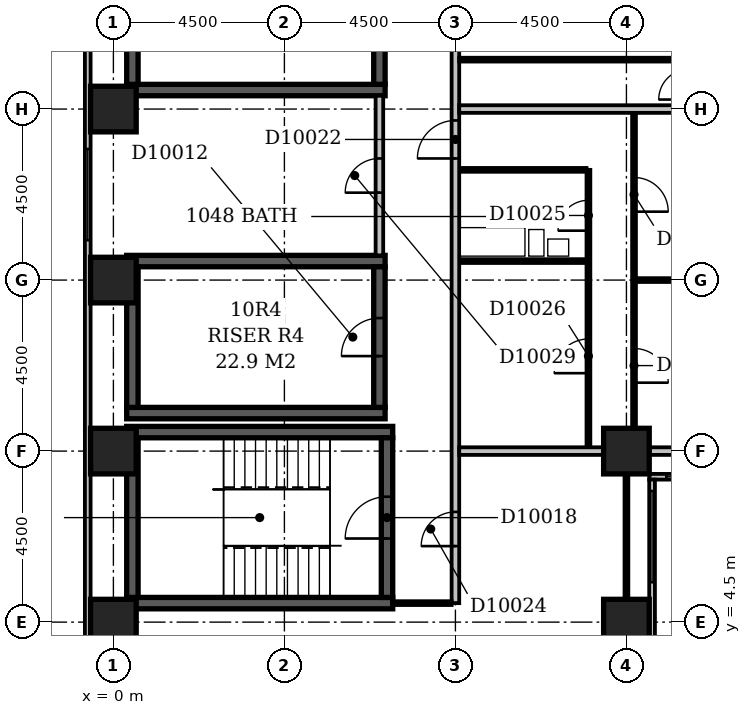
"""IFC4 building model, lengths in metres.
Left out: names, types, materials, properties, quantities, classifications, styles, units other than length and angle.
Written with IfcOpenShell. Run it as: python <this file> out.ifc"""

import sys

from ifc_helpers import new_model, si_unit, direction, frame, frame_2d, origin, origin_2d, place, context, subcontext, project, spatial, rectangle, extrude, element, fill, save


model = new_model("IFC4")
c1 = context("Model", 3, precision=1e-05, world=origin(), true_north=direction((0.0, 1.0)))
c2 = subcontext(c1, "Body", "Model", "MODEL_VIEW")
j1 = project(units=[si_unit("LENGTHUNIT", "METRE"), si_unit("PLANEANGLEUNIT", "RADIAN")], contexts=[c1])
p1 = place(None, origin())
s1 = spatial("IfcSite", under=j1, at=p1, CompositionType="ELEMENT")
p2 = place(p1, origin())
s2 = spatial("IfcBuilding", under=s1, at=p2, CompositionType="ELEMENT")
p3 = place(p2, frame((0.0, 0.0, 47.0)))
s3 = spatial("IfcBuildingStorey", under=s2, at=p3, CompositionType="ELEMENT", Elevation=47.0)
for number, where, z_axis, x_axis in (
    (1, (0.35, 5.0, -0.3), (0.0, 0.0, 1.0), (1.0, 0.0, 0.0)),
    (2, (0.35, 9.5, -0.3), (0.0, 0.0, 1.0), (1.0, 0.0, 0.0)),
):
    element("IfcWall", number, at=place(p3, frame(where, z_axis=z_axis, x_axis=x_axis)), inside=s3, PredefinedType="SHEAR", context=c2, shape_type="SweptSolid", body=[
        extrude(rectangle(XDim=7.0, YDim=0.3, at=frame_2d((3.5, 0.0))), origin(), (0.0, 0.0, 1.0), 3.6),
    ])
for number, where, z_axis, x_axis in (
    (3, (0.35, 10.0, -0.3), (0.0, 0.0, 1.0), (1.0, 0.0, 0.0)),
    (4, (0.35, 14.0, -0.3), (0.0, 0.0, 1.0), (1.0, 0.0, 0.0)),
    (5, (0.35, 18.5, -0.3), (0.0, 0.0, 1.0), (1.0, 0.0, 0.0)),
):
    element("IfcWall", number, at=place(p3, frame(where, z_axis=z_axis, x_axis=x_axis)), inside=s3, PredefinedType="SHEAR", context=c2, shape_type="SweptSolid", body=[
        extrude(rectangle(XDim=6.8, YDim=0.3, at=frame_2d((3.4, 0.0))), origin(), (0.0, 0.0, 1.0), 3.6),
    ])
p4 = place(p3, frame((0.5, 5.15, -0.3), z_axis=(0.0, 0.0, 1.0), x_axis=(0.0, 1.0, 0.0)))
e6 = element("IfcWall", 6, at=p4, inside=s3, PredefinedType="SHEAR", context=c2, shape_type="SweptSolid", body=[
    extrude(rectangle(XDim=4.2, YDim=0.3, at=frame_2d((2.1, 0.0))), origin(), (0.0, 0.0, 1.0), 3.6),
])
for number, where, z_axis, x_axis in (
    (7, (0.5, 10.15, -0.3), (0.0, 0.0, 1.0), (0.0, 1.0, 0.0)),
    (8, (0.5, 18.65, -0.3), (0.0, 0.0, 1.0), (0.0, 1.0, 0.0)),
):
    element("IfcWall", number, at=place(p3, frame(where, z_axis=z_axis, x_axis=x_axis)), inside=s3, PredefinedType="SHEAR", context=c2, shape_type="SweptSolid", body=[
        extrude(rectangle(XDim=3.7, YDim=0.3, at=frame_2d((1.85, 0.0))), origin(), (0.0, 0.0, 1.0), 3.6),
    ])
p5 = place(p3, frame((7.0, 10.15, -0.3), z_axis=(0.0, 0.0, 1.0), x_axis=(0.0, 1.0, 0.0)))
e9 = element("IfcWall", 9, at=p5, inside=s3, PredefinedType="SHEAR", context=c2, shape_type="SweptSolid", body=[
    extrude(rectangle(XDim=3.7, YDim=0.3, at=frame_2d((1.85, 0.0))), origin(), (0.0, 0.0, 1.0), 3.6),
])
p6 = place(p5, frame((1.35, 0.0, 0.3)))
e10 = element("IfcOpeningElement", 10, at=p6, cuts=e9, PredefinedType="OPENING", context=c2, shape_type="SweptSolid", body=[
    extrude(rectangle(XDim=1.0, YDim=2.1, at=frame_2d((0.5, 1.05))), frame((0.0, 0.162, 0.0), z_axis=(0.0, -1.0, 0.0), x_axis=(1.0, 0.0, 0.0)), (0.0, 0.0, 1.0), 0.324),
])
p7 = place(p3, frame((7.0, 18.65, -0.3), z_axis=(0.0, 0.0, 1.0), x_axis=(0.0, 1.0, 0.0)))
e11 = element("IfcWall", 11, at=p7, inside=s3, PredefinedType="SHEAR", context=c2, shape_type="SweptSolid", body=[
    extrude(rectangle(XDim=3.7, YDim=0.3, at=frame_2d((1.85, 0.0))), origin(), (0.0, 0.0, 1.0), 3.6),
])
p8 = place(p7, frame((1.35, 0.0, 0.3)))
e12 = element("IfcOpeningElement", 12, at=p8, cuts=e11, PredefinedType="OPENING", context=c2, shape_type="SweptSolid", body=[
    extrude(rectangle(XDim=1.0, YDim=2.1, at=frame_2d((0.5, 1.05))), frame((0.0, 0.162, 0.0), z_axis=(0.0, -1.0, 0.0), x_axis=(1.0, 0.0, 0.0)), (0.0, 0.0, 1.0), 0.324),
])
p9 = place(p3, frame((7.2, 5.15, -0.3), z_axis=(0.0, 0.0, 1.0), x_axis=(0.0, 1.0, 0.0)))
e13 = element("IfcWall", 13, at=p9, inside=s3, PredefinedType="SHEAR", context=c2, shape_type="SweptSolid", body=[
    extrude(rectangle(XDim=4.2, YDim=0.3, at=frame_2d((2.1, 0.0))), origin(), (0.0, 0.0, 1.0), 3.6),
])
p10 = place(p9, frame((1.55, 0.0, 0.3)))
e14 = element("IfcOpeningElement", 14, at=p10, cuts=e13, PredefinedType="OPENING", context=c2, shape_type="SweptSolid", body=[
    extrude(rectangle(XDim=1.1, YDim=2.1, at=frame_2d((0.55, 1.05))), frame((0.0, 0.162, 0.0), z_axis=(0.0, -1.0, 0.0), x_axis=(1.0, 0.0, 0.0)), (0.0, 0.0, 1.0), 0.324),
])
for number, where, z_axis, x_axis in (
    (15, (0.0, 4.5, -0.3), (0.0, 0.0, 1.0), (1.0, 0.0, 0.0)),
    (16, (13.5, 4.5, -0.3), (0.0, 0.0, 1.0), (1.0, 0.0, 0.0)),
    (17, (0.0, 9.0, -0.3), (0.0, 0.0, 1.0), (1.0, 0.0, 0.0)),
    (18, (13.5, 9.0, -0.3), (0.0, 0.0, 1.0), (1.0, 0.0, 0.0)),
    (19, (0.0, 13.5, -0.3), (0.0, 0.0, 1.0), (1.0, 0.0, 0.0)),
    (20, (0.0, 18.0, -0.3), (0.0, 0.0, 1.0), (1.0, 0.0, 0.0)),
):
    element("IfcColumn", number, at=place(p3, frame(where, z_axis=z_axis, x_axis=x_axis)), inside=s3, PredefinedType="COLUMN", context=c2, shape_type="SweptSolid", body=[
        extrude(rectangle(XDim=1.2, YDim=1.2, at=origin_2d()), origin(), (0.0, 0.0, 1.0), 3.6),
    ])
p11 = place(p3, frame((14.175, 3.9, 0.0), z_axis=(0.0, 0.0, 1.0), x_axis=(0.0, 1.0, 0.0)))
e21 = element("IfcWall", 21, at=p11, inside=s3, PredefinedType="STANDARD", context=c2, shape_type="SweptSolid", body=[
    extrude(rectangle(XDim=4.35, YDim=0.15, at=frame_2d((2.175, 0.0))), origin(), (0.0, 0.0, 1.0), 2.7),
])
p12 = place(p11, frame((1.65, 0.0, 0.6)))
e22 = element("IfcOpeningElement", 22, at=p12, cuts=e21, PredefinedType="OPENING", context=c2, shape_type="SweptSolid", body=[
    extrude(rectangle(XDim=2.4, YDim=1.8, at=frame_2d((1.2, 0.9))), frame((0.0, 0.087, 0.0), z_axis=(0.0, -1.0, 0.0), x_axis=(1.0, 0.0, 0.0)), (0.0, 0.0, 1.0), 0.174),
])
p13 = place(p3, frame((14.1, 8.325, 0.0), z_axis=(0.0, 0.0, 1.0), x_axis=(1.0, 0.0, 0.0)))
e23 = element("IfcWall", 23, at=p13, inside=s3, PredefinedType="STANDARD", context=c2, shape_type="SweptSolid", body=[
    extrude(rectangle(XDim=4.65, YDim=0.15, at=frame_2d((2.325, 0.0))), origin(), (0.0, 0.0, 1.0), 2.7),
])
p14 = place(p13, frame((0.45, 0.0, 0.6)))
e24 = element("IfcOpeningElement", 24, at=p14, cuts=e23, PredefinedType="OPENING", context=c2, shape_type="SweptSolid", body=[
    extrude(rectangle(XDim=2.4, YDim=1.8, at=frame_2d((1.2, 0.9))), frame((0.0, 0.087, 0.0), z_axis=(0.0, -1.0, 0.0), x_axis=(1.0, 0.0, 0.0)), (0.0, 0.0, 1.0), 0.174),
])
p15 = place(p3, frame((-0.675, 59.1, 0.0), z_axis=(0.0, 0.0, 1.0), x_axis=(0.0, -1.0, 0.0)))
e25 = element("IfcWall", 25, at=p15, inside=s3, PredefinedType="STANDARD", context=c2, shape_type="SweptSolid", body=[
    extrude(rectangle(XDim=55.35, YDim=0.15, at=frame_2d((27.675, 0.0))), origin(), (0.0, 0.0, 1.0), 2.7),
])
p16 = place(p15, frame((10.65, 0.0, 0.6)))
e26 = element("IfcOpeningElement", 26, at=p16, cuts=e25, PredefinedType="OPENING", context=c2, shape_type="SweptSolid", body=[
    extrude(rectangle(XDim=2.4, YDim=1.8, at=frame_2d((1.2, 0.9))), frame((0.0, 0.087, 0.0), z_axis=(0.0, -1.0, 0.0), x_axis=(1.0, 0.0, 0.0)), (0.0, 0.0, 1.0), 0.174),
])
p17 = place(p15, frame((42.15, 0.0, 0.6)))
e27 = element("IfcOpeningElement", 27, at=p17, cuts=e25, PredefinedType="OPENING", context=c2, shape_type="SweptSolid", body=[
    extrude(rectangle(XDim=2.4, YDim=1.8, at=frame_2d((1.2, 0.9))), frame((0.0, 0.087, 0.0), z_axis=(0.0, -1.0, 0.0), x_axis=(1.0, 0.0, 0.0)), (0.0, 0.0, 1.0), 0.174),
])
p18 = place(p3, frame((0.0, 4.4, 0.0), z_axis=(0.0, 0.0, 1.0), x_axis=(0.0, 1.0, 0.0)))
e28 = element("IfcWall", 28, at=p18, inside=s3, PredefinedType="PARTITIONING", context=c2, shape_type="SweptSolid", body=[
    extrude(rectangle(XDim=0.7, YDim=0.1, at=frame_2d((0.35, 0.0))), origin(), (0.0, 0.0, 1.0), 2.7),
])
p19 = place(p3, frame((7.349, 5.0, 0.0), z_axis=(0.0, 0.0, 1.0), x_axis=(1.0, 0.0, 0.0)))
e29 = element("IfcWall", 29, at=p19, inside=s3, PredefinedType="PARTITIONING", context=c2, shape_type="SweptSolid", body=[
    extrude(rectangle(XDim=1.551, YDim=0.1, at=frame_2d((0.775, 0.0))), origin(), (0.0, 0.0, 1.0), 3.3),
])
p20 = place(p3, frame((9.0, 5.0, 0.0), z_axis=(0.0, 0.0, 1.0), x_axis=(0.0, 1.0, 0.0)))
e30 = element("IfcWall", 30, at=p20, inside=s3, PredefinedType="PARTITIONING", context=c2, shape_type="SweptSolid", body=[
    extrude(rectangle(XDim=44.5, YDim=0.2, at=frame_2d((22.25, 0.0))), origin(), (0.0, 0.0, 1.0), 3.3),
])
p21 = place(p20, frame((28.45, 0.0, 0.0)))
e31 = element("IfcOpeningElement", 31, at=p21, cuts=e30, PredefinedType="OPENING", context=c2, shape_type="SweptSolid", body=[
    extrude(rectangle(XDim=1.0, YDim=2.1, at=frame_2d((0.5, 1.05))), frame((0.0, 0.112, 0.0), z_axis=(0.0, -1.0, 0.0), x_axis=(1.0, 0.0, 0.0)), (0.0, 0.0, 1.0), 0.224),
])
p22 = place(p20, frame((17.8, 0.0, 0.0)))
e32 = element("IfcOpeningElement", 32, at=p22, cuts=e30, PredefinedType="OPENING", context=c2, shape_type="SweptSolid", body=[
    extrude(rectangle(XDim=1.0, YDim=2.1, at=frame_2d((0.5, 1.05))), frame((0.0, 0.112, 0.0), z_axis=(0.0, -1.0, 0.0), x_axis=(1.0, 0.0, 0.0)), (0.0, 0.0, 1.0), 0.224),
])
p23 = place(p20, frame((14.55, 0.0, 0.0)))
e33 = element("IfcOpeningElement", 33, at=p23, cuts=e30, PredefinedType="OPENING", context=c2, shape_type="SweptSolid", body=[
    extrude(rectangle(XDim=1.0, YDim=2.1, at=frame_2d((0.5, 1.05))), frame((0.0, 0.112, 0.0), z_axis=(0.0, -1.0, 0.0), x_axis=(1.0, 0.0, 0.0)), (0.0, 0.0, 1.0), 0.224),
])
p24 = place(p20, frame((11.7, 0.0, 0.0)))
e34 = element("IfcOpeningElement", 34, at=p24, cuts=e30, PredefinedType="OPENING", context=c2, shape_type="SweptSolid", body=[
    extrude(rectangle(XDim=1.0, YDim=2.1, at=frame_2d((0.5, 1.05))), frame((0.0, 0.112, 0.0), z_axis=(0.0, -1.0, 0.0), x_axis=(1.0, 0.0, 0.0)), (0.0, 0.0, 1.0), 0.224),
])
p25 = place(p20, frame((35.0, 0.0, 0.0)))
e35 = element("IfcOpeningElement", 35, at=p25, cuts=e30, PredefinedType="OPENING", context=c2, shape_type="SweptSolid", body=[
    extrude(rectangle(XDim=0.9, YDim=2.1, at=frame_2d((0.45, 1.05))), frame((0.0, 0.112, 0.0), z_axis=(0.0, -1.0, 0.0), x_axis=(1.0, 0.0, 0.0)), (0.0, 0.0, 1.0), 0.224),
])
p26 = place(p20, frame((1.5, 0.0, 0.0)))
e36 = element("IfcOpeningElement", 36, at=p26, cuts=e30, PredefinedType="OPENING", context=c2, shape_type="SweptSolid", body=[
    extrude(rectangle(XDim=0.9, YDim=2.1, at=frame_2d((0.45, 1.05))), frame((0.0, 0.112, 0.0), z_axis=(0.0, -1.0, 0.0), x_axis=(1.0, 0.0, 0.0)), (0.0, 0.0, 1.0), 0.224),
])
p27 = place(p3, frame((13.5, 5.1, 0.0), z_axis=(0.0, 0.0, 1.0), x_axis=(0.0, 1.0, 0.0)))
e37 = element("IfcWall", 37, at=p27, inside=s3, PredefinedType="PARTITIONING", context=c2, shape_type="SweptSolid", body=[
    extrude(rectangle(XDim=3.3, YDim=0.1, at=frame_2d((1.65, 0.0))), origin(), (0.0, 0.0, 1.0), 2.7),
])
p28 = place(p3, frame((9.1, 9.0, 0.0), z_axis=(0.0, 0.0, 1.0), x_axis=(1.0, 0.0, 0.0)))
e38 = element("IfcWall", 38, at=p28, inside=s3, PredefinedType="PARTITIONING", context=c2, shape_type="SweptSolid", body=[
    extrude(rectangle(XDim=3.8, YDim=0.2, at=frame_2d((1.9, 0.0))), origin(), (0.0, 0.0, 1.0), 3.3),
])
p29 = place(p3, frame((14.1, 9.0, 0.0), z_axis=(0.0, 0.0, 1.0), x_axis=(1.0, 0.0, 0.0)))
e39 = element("IfcWall", 39, at=p29, inside=s3, PredefinedType="PARTITIONING", context=c2, shape_type="SweptSolid", body=[
    extrude(rectangle(XDim=3.3, YDim=0.2, at=frame_2d((1.65, 0.0))), origin(), (0.0, 0.0, 1.0), 2.7),
])
p30 = place(p3, frame((12.5, 9.1, 0.0), z_axis=(0.0, 0.0, 1.0), x_axis=(0.0, 1.0, 0.0)))
e40 = element("IfcWall", 40, at=p30, inside=s3, PredefinedType="PARTITIONING", context=c2, shape_type="SweptSolid", body=[
    extrude(rectangle(XDim=7.3, YDim=0.1, at=frame_2d((3.65, 0.0))), origin(), (0.0, 0.0, 1.0), 3.3),
])
p31 = place(p30, frame((5.7, 0.0, 0.0)))
e41 = element("IfcOpeningElement", 41, at=p31, cuts=e40, PredefinedType="OPENING", context=c2, shape_type="SweptSolid", body=[
    extrude(rectangle(XDim=0.8, YDim=2.1, at=frame_2d((0.4, 1.05))), frame((0.0, 0.062, 0.0), z_axis=(0.0, -1.0, 0.0), x_axis=(1.0, 0.0, 0.0)), (0.0, 0.0, 1.0), 0.124),
])
p32 = place(p30, frame((1.95, 0.0, 0.0)))
e42 = element("IfcOpeningElement", 42, at=p32, cuts=e40, PredefinedType="OPENING", context=c2, shape_type="SweptSolid", body=[
    extrude(rectangle(XDim=0.9, YDim=2.1, at=frame_2d((0.45, 1.05))), frame((0.0, 0.062, 0.0), z_axis=(0.0, -1.0, 0.0), x_axis=(1.0, 0.0, 0.0)), (0.0, 0.0, 1.0), 0.124),
])
p33 = place(p3, frame((13.7, 9.6, 0.0), z_axis=(0.0, 0.0, 1.0), x_axis=(0.0, 1.0, 0.0)))
e43 = element("IfcWall", 43, at=p33, inside=s3, PredefinedType="PARTITIONING", context=c2, shape_type="SweptSolid", body=[
    extrude(rectangle(XDim=8.3, YDim=0.1, at=frame_2d((4.15, 0.0))), origin(), (0.0, 0.0, 1.0), 3.3),
])
p34 = place(p33, frame((1.2, 0.0, 0.0)))
e44 = element("IfcOpeningElement", 44, at=p34, cuts=e43, PredefinedType="OPENING", context=c2, shape_type="SweptSolid", body=[
    extrude(rectangle(XDim=0.9, YDim=2.1, at=frame_2d((0.45, 1.05))), frame((0.0, 0.062, 0.0), z_axis=(0.0, -1.0, 0.0), x_axis=(1.0, 0.0, 0.0)), (0.0, 0.0, 1.0), 0.124),
])
p35 = place(p33, frame((5.7, 0.0, 0.0)))
e45 = element("IfcOpeningElement", 45, at=p35, cuts=e43, PredefinedType="OPENING", context=c2, shape_type="SweptSolid", body=[
    extrude(rectangle(XDim=0.9, YDim=2.1, at=frame_2d((0.45, 1.05))), frame((0.0, 0.062, 0.0), z_axis=(0.0, -1.0, 0.0), x_axis=(1.0, 0.0, 0.0)), (0.0, 0.0, 1.0), 0.124),
])
p36 = place(p3, frame((13.75, 13.5, 0.0), z_axis=(0.0, 0.0, 1.0), x_axis=(1.0, 0.0, 0.0)))
e46 = element("IfcWall", 46, at=p36, inside=s3, PredefinedType="PARTITIONING", context=c2, shape_type="SweptSolid", body=[
    extrude(rectangle(XDim=3.65, YDim=0.1, at=frame_2d((1.825, 0.0))), origin(), (0.0, 0.0, 1.0), 3.3),
])
p37 = place(p3, frame((9.1, 14.0, 0.0), z_axis=(0.0, 0.0, 1.0), x_axis=(1.0, 0.0, 0.0)))
e47 = element("IfcWall", 47, at=p37, inside=s3, PredefinedType="PLUMBINGWALL", context=c2, shape_type="SweptSolid", body=[
    extrude(rectangle(XDim=3.35, YDim=0.1, at=frame_2d((1.675, 0.0))), origin(), (0.0, 0.0, 1.0), 3.3),
])
p38 = place(p3, frame((7.0, 14.15, 0.0), z_axis=(0.0, 0.0, 1.0), x_axis=(0.0, 1.0, 0.0)))
e48 = element("IfcWall", 48, at=p38, inside=s3, PredefinedType="PARTITIONING", context=c2, shape_type="SweptSolid", body=[
    extrude(rectangle(XDim=4.2, YDim=0.2, at=frame_2d((2.1, 0.0))), origin(), (0.0, 0.0, 1.0), 3.3),
])
p39 = place(p38, frame((1.65, 0.0, 0.0)))
e49 = element("IfcOpeningElement", 49, at=p39, cuts=e48, PredefinedType="OPENING", context=c2, shape_type="SweptSolid", body=[
    extrude(rectangle(XDim=0.9, YDim=2.1, at=frame_2d((0.45, 1.05))), frame((0.0, 0.112, 0.0), z_axis=(0.0, -1.0, 0.0), x_axis=(1.0, 0.0, 0.0)), (0.0, 0.0, 1.0), 0.224),
])
p40 = place(p3, frame((9.1, 16.4, 0.0), z_axis=(0.0, 0.0, 1.0), x_axis=(1.0, 0.0, 0.0)))
e50 = element("IfcWall", 50, at=p40, inside=s3, PredefinedType="PLUMBINGWALL", context=c2, shape_type="SweptSolid", body=[
    extrude(rectangle(XDim=3.35, YDim=0.1, at=frame_2d((1.675, 0.0))), origin(), (0.0, 0.0, 1.0), 3.3),
])
p41 = place(p3, frame((9.1, 18.0, 0.0), z_axis=(0.0, 0.0, 1.0), x_axis=(1.0, 0.0, 0.0)))
e51 = element("IfcWall", 51, at=p41, inside=s3, PredefinedType="PARTITIONING", context=c2, shape_type="SweptSolid", body=[
    extrude(rectangle(XDim=8.3, YDim=0.2, at=frame_2d((4.15, 0.0))), origin(), (0.0, 0.0, 1.0), 2.6),
])
p42 = place(p3, frame((9.1, 19.3, 0.0), z_axis=(0.0, 0.0, 1.0), x_axis=(1.0, 0.0, 0.0)))
e52 = element("IfcWall", 52, at=p42, inside=s3, PredefinedType="PARTITIONING", context=c2, shape_type="SweptSolid", body=[
    extrude(rectangle(XDim=6.0, YDim=0.1, at=frame_2d((3.0, 0.0))), origin(), (0.0, 0.0, 1.0), 3.3),
])
p43 = place(p12, origin())
e53 = element("IfcWindow", 53, at=p43, inside=s3, PartitioningType="SINGLE_PANEL", PredefinedType="WINDOW", context=c2, shape_type="SweptSolid", body=[
    extrude(rectangle(XDim=2.4, YDim=1.8, at=frame_2d((1.2, 0.9))), frame((0.0, 0.03, 0.0), z_axis=(0.0, -1.0, 0.0), x_axis=(1.0, 0.0, 0.0)), (0.0, 0.0, 1.0), 0.06),
])
fill(e22, e53)
p44 = place(p14, origin())
e54 = element("IfcWindow", 54, at=p44, inside=s3, PartitioningType="SINGLE_PANEL", PredefinedType="WINDOW", context=c2, shape_type="SweptSolid", body=[
    extrude(rectangle(XDim=2.4, YDim=1.8, at=frame_2d((1.2, 0.9))), frame((0.0, 0.03, 0.0), z_axis=(0.0, -1.0, 0.0), x_axis=(1.0, 0.0, 0.0)), (0.0, 0.0, 1.0), 0.06),
])
fill(e24, e54)
p45 = place(p17, origin())
e55 = element("IfcWindow", 55, at=p45, inside=s3, PartitioningType="SINGLE_PANEL", PredefinedType="WINDOW", context=c2, shape_type="SweptSolid", body=[
    extrude(rectangle(XDim=2.4, YDim=1.8, at=frame_2d((1.2, 0.9))), frame((0.0, 0.03, 0.0), z_axis=(0.0, -1.0, 0.0), x_axis=(1.0, 0.0, 0.0)), (0.0, 0.0, 1.0), 0.06),
])
fill(e27, e55)
p46 = place(p6, origin())
e56 = element("IfcDoor", 56, at=p46, inside=s3, OperationType="SINGLE_SWING_LEFT", PredefinedType="DOOR", context=c2, shape_type="SweptSolid", body=[
    extrude(rectangle(XDim=1.0, YDim=2.1, at=frame_2d((0.5, 1.05))), frame((0.0, 0.025, 0.0), z_axis=(0.0, -1.0, 0.0), x_axis=(1.0, 0.0, 0.0)), (0.0, 0.0, 1.0), 0.05),
])
fill(e10, e56)
p47 = place(p10, origin())
e57 = element("IfcDoor", 57, at=p47, inside=s3, OperationType="SINGLE_SWING_LEFT", PredefinedType="DOOR", context=c2, shape_type="SweptSolid", body=[
    extrude(rectangle(XDim=1.1, YDim=2.1, at=frame_2d((0.55, 1.05))), frame((0.0, 0.025, 0.0), z_axis=(0.0, -1.0, 0.0), x_axis=(1.0, 0.0, 0.0)), (0.0, 0.0, 1.0), 0.05),
])
fill(e14, e57)
p48 = place(p24, origin())
e58 = element("IfcDoor", 58, at=p48, inside=s3, OperationType="SINGLE_SWING_LEFT", PredefinedType="DOOR", context=c2, shape_type="SweptSolid", body=[
    extrude(rectangle(XDim=1.0, YDim=2.1, at=frame_2d((0.5, 1.05))), frame((0.0, 0.025, 0.0), z_axis=(0.0, -1.0, 0.0), x_axis=(1.0, 0.0, 0.0)), (0.0, 0.0, 1.0), 0.05),
])
fill(e34, e58)
p49 = place(p26, origin())
e59 = element("IfcDoor", 59, at=p49, inside=s3, OperationType="SINGLE_SWING_LEFT", PredefinedType="DOOR", context=c2, shape_type="SweptSolid", body=[
    extrude(rectangle(XDim=0.9, YDim=2.1, at=frame_2d((0.45, 1.05))), frame((0.0, 0.025, 0.0), z_axis=(0.0, -1.0, 0.0), x_axis=(1.0, 0.0, 0.0)), (0.0, 0.0, 1.0), 0.05),
])
fill(e36, e59)
p50 = place(p31, origin())
e60 = element("IfcDoor", 60, at=p50, inside=s3, OperationType="SINGLE_SWING_LEFT", PredefinedType="DOOR", context=c2, shape_type="SweptSolid", body=[
    extrude(rectangle(XDim=0.8, YDim=2.1, at=frame_2d((0.4, 1.05))), frame((0.0, 0.025, 0.0), z_axis=(0.0, -1.0, 0.0), x_axis=(1.0, 0.0, 0.0)), (0.0, 0.0, 1.0), 0.05),
])
fill(e41, e60)
p51 = place(p32, origin())
e61 = element("IfcDoor", 61, at=p51, inside=s3, OperationType="SINGLE_SWING_LEFT", PredefinedType="DOOR", context=c2, shape_type="SweptSolid", body=[
    extrude(rectangle(XDim=0.9, YDim=2.1, at=frame_2d((0.45, 1.05))), frame((0.0, 0.025, 0.0), z_axis=(0.0, -1.0, 0.0), x_axis=(1.0, 0.0, 0.0)), (0.0, 0.0, 1.0), 0.05),
])
fill(e42, e61)
p52 = place(p34, frame((0.9, 0.0, 0.0), z_axis=(0.0, 0.0, 1.0), x_axis=(-1.0, 0.0, 0.0)))
e62 = element("IfcDoor", 62, at=p52, inside=s3, OperationType="SINGLE_SWING_RIGHT", PredefinedType="DOOR", context=c2, shape_type="SweptSolid", body=[
    extrude(rectangle(XDim=0.9, YDim=2.1, at=frame_2d((0.45, 1.05))), frame((0.0, 0.025, 0.0), z_axis=(0.0, -1.0, 0.0), x_axis=(1.0, 0.0, 0.0)), (0.0, 0.0, 1.0), 0.05),
])
fill(e44, e62)
p53 = place(p35, frame((0.9, 0.0, 0.0), z_axis=(0.0, 0.0, 1.0), x_axis=(-1.0, 0.0, 0.0)))
e63 = element("IfcDoor", 63, at=p53, inside=s3, OperationType="SINGLE_SWING_RIGHT", PredefinedType="DOOR", context=c2, shape_type="SweptSolid", body=[
    extrude(rectangle(XDim=0.9, YDim=2.1, at=frame_2d((0.45, 1.05))), frame((0.0, 0.025, 0.0), z_axis=(0.0, -1.0, 0.0), x_axis=(1.0, 0.0, 0.0)), (0.0, 0.0, 1.0), 0.05),
])
fill(e45, e63)
p54 = place(p39, origin())
e64 = element("IfcDoor", 64, at=p54, inside=s3, OperationType="SINGLE_SWING_LEFT", PredefinedType="DOOR", context=c2, shape_type="SweptSolid", body=[
    extrude(rectangle(XDim=0.9, YDim=2.1, at=frame_2d((0.45, 1.05))), frame((0.0, 0.025, 0.0), z_axis=(0.0, -1.0, 0.0), x_axis=(1.0, 0.0, 0.0)), (0.0, 0.0, 1.0), 0.05),
])
fill(e49, e64)
save(model, sys.argv[1])
